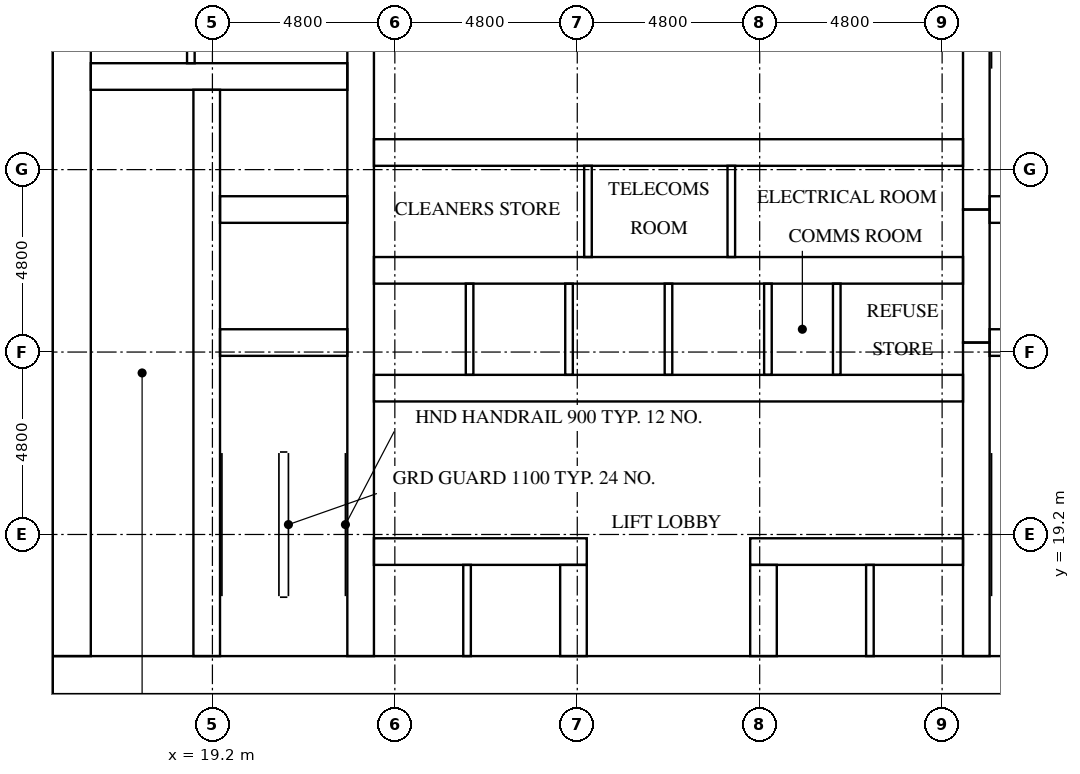
"""IFC4 building model, lengths in metres.
Left out: names, types, materials, properties, quantities, classifications, styles, units other than length and angle.
Written with IfcOpenShell. Run it as: python <this file> out.ifc"""

import sys

from ifc_helpers import new_model, si_unit, direction, frame, frame_2d, origin, place, context, subcontext, project, spatial, rectangle, extrude, element, fill, save


model = new_model("IFC4")
c1 = context("Model", 3, precision=1e-05, world=origin(), true_north=direction((0.0, 1.0)))
c2 = subcontext(c1, "Body", "Model", "MODEL_VIEW")
j1 = project(units=[si_unit("LENGTHUNIT", "METRE"), si_unit("PLANEANGLEUNIT", "RADIAN")], contexts=[c1])
p1 = place(None, origin())
s1 = spatial("IfcSite", under=j1, at=p1, CompositionType="ELEMENT")
p2 = place(p1, origin())
s2 = spatial("IfcBuilding", under=s1, at=p2, CompositionType="ELEMENT")
p3 = place(p2, frame((0.0, 0.0, 6.0)))
s3 = spatial("IfcBuildingStorey", under=s2, at=p3, CompositionType="ELEMENT", Elevation=6.0)
p4 = place(p3, frame((15.0, 15.5, 0.0), z_axis=(0.0, 0.0, 1.0), x_axis=(1.0, 0.0, 0.0)))
e1 = element("IfcWall", 1, at=p4, inside=s3, PredefinedType="SHEAR", context=c2, shape_type="SweptSolid", body=[
    extrude(rectangle(XDim=32.4, YDim=1.0, at=frame_2d((16.2, 0.0))), origin(), (0.0, 0.0, 1.0), 4.2),
])
p5 = place(p4, frame((15.3, 0.0, 0.0)))
e2 = element("IfcOpeningElement", 2, at=p5, cuts=e1, PredefinedType="OPENING", context=c2, shape_type="SweptSolid", body=[
    extrude(rectangle(XDim=1.8, YDim=2.1, at=frame_2d((0.9, 1.05))), frame((0.0, 0.51, 0.0), z_axis=(0.0, -1.0, 0.0), x_axis=(1.0, 0.0, 0.0)), (0.0, 0.0, 1.0), 1.02),
])
p6 = place(p3, frame((15.5, 16.0, 0.0), z_axis=(0.0, 0.0, 1.0), x_axis=(0.0, 1.0, 0.0)))
e3 = element("IfcWall", 3, at=p6, inside=s3, PredefinedType="SHEAR", context=c2, shape_type="SweptSolid", body=[
    extrude(rectangle(XDim=20.8, YDim=1.0, at=frame_2d((10.4, 0.0))), origin(), (0.0, 0.0, 1.0), 4.2),
])
p7 = place(p6, frame((4.76, 0.0, 0.0)))
e4 = element("IfcOpeningElement", 4, at=p7, cuts=e3, PredefinedType="OPENING", context=c2, shape_type="SweptSolid", body=[
    extrude(rectangle(XDim=1.2, YDim=2.1, at=frame_2d((0.6, 1.05))), frame((0.0, 0.51, 0.0), z_axis=(0.0, -1.0, 0.0), x_axis=(1.0, 0.0, 0.0)), (0.0, 0.0, 1.0), 1.02),
])
p8 = place(p3, frame((19.05, 16.0, 0.0), z_axis=(0.0, 0.0, 1.0), x_axis=(0.0, 1.0, 0.0)))
e5 = element("IfcWall", 5, at=p8, inside=s3, PredefinedType="SHEAR", context=c2, shape_type="SweptSolid", body=[
    extrude(rectangle(XDim=14.9, YDim=0.7, at=frame_2d((7.45, 0.0))), origin(), (0.0, 0.0, 1.0), 4.2),
])
p9 = place(p8, frame((9.45, 0.0, 0.0)))
e6 = element("IfcOpeningElement", 6, at=p9, cuts=e5, PredefinedType="OPENING", context=c2, shape_type="SweptSolid", body=[
    extrude(rectangle(XDim=1.1, YDim=2.1, at=frame_2d((0.55, 1.05))), frame((0.0, 0.36, 0.0), z_axis=(0.0, -1.0, 0.0), x_axis=(1.0, 0.0, 0.0)), (0.0, 0.0, 1.0), 0.72),
])
p10 = place(p8, frame((12.95, 0.0, 0.0)))
e7 = element("IfcOpeningElement", 7, at=p10, cuts=e5, PredefinedType="OPENING", context=c2, shape_type="SweptSolid", body=[
    extrude(rectangle(XDim=1.1, YDim=2.1, at=frame_2d((0.55, 1.05))), frame((0.0, 0.36, 0.0), z_axis=(0.0, -1.0, 0.0), x_axis=(1.0, 0.0, 0.0)), (0.0, 0.0, 1.0), 0.72),
])
p11 = place(p8, frame((0.2, 0.0, 0.0)))
e8 = element("IfcOpeningElement", 8, at=p11, cuts=e5, PredefinedType="OPENING", context=c2, shape_type="SweptSolid", body=[
    extrude(rectangle(XDim=1.2, YDim=2.1, at=frame_2d((0.6, 1.05))), frame((0.0, 0.36, 0.0), z_axis=(0.0, -1.0, 0.0), x_axis=(1.0, 0.0, 0.0)), (0.0, 0.0, 1.0), 0.72),
])
p12 = place(p3, frame((23.1, 16.0, 0.0), z_axis=(0.0, 0.0, 1.0), x_axis=(0.0, 1.0, 0.0)))
e9 = element("IfcWall", 9, at=p12, inside=s3, PredefinedType="SHEAR", context=c2, shape_type="SweptSolid", body=[
    extrude(rectangle(XDim=20.8, YDim=0.7, at=frame_2d((10.4, 0.0))), origin(), (0.0, 0.0, 1.0), 4.2),
])
p13 = place(p3, frame((39.3, 16.0, 0.0), z_axis=(0.0, 0.0, 1.0), x_axis=(0.0, 1.0, 0.0)))
e10 = element("IfcWall", 10, at=p13, inside=s3, PredefinedType="SHEAR", context=c2, shape_type="SweptSolid", body=[
    extrude(rectangle(XDim=8.25, YDim=0.7, at=frame_2d((4.125, 0.0))), origin(), (0.0, 0.0, 1.0), 4.2),
])
p14 = place(p3, frame((39.3, 24.25, 0.0), z_axis=(0.0, 0.0, 1.0), x_axis=(0.0, 1.0, 0.0)))
e11 = element("IfcWall", 11, at=p14, inside=s3, PredefinedType="SHEAR", context=c2, shape_type="SweptSolid", body=[
    extrude(rectangle(XDim=3.5, YDim=0.7, at=frame_2d((1.75, 0.0))), origin(), (0.0, 0.0, 1.0), 4.2),
])
p15 = place(p3, frame((39.3, 27.75, 0.0), z_axis=(0.0, 0.0, 1.0), x_axis=(0.0, 1.0, 0.0)))
e12 = element("IfcWall", 12, at=p15, inside=s3, PredefinedType="SHEAR", context=c2, shape_type="SweptSolid", body=[
    extrude(rectangle(XDim=9.05, YDim=0.7, at=frame_2d((4.525, 0.0))), origin(), (0.0, 0.0, 1.0), 4.2),
])
for number, where, z_axis, x_axis in (
    (13, (19.4, 24.25, 0.0), (0.0, 0.0, 1.0), (1.0, 0.0, 0.0)),
    (14, (19.4, 27.75, 0.0), (0.0, 0.0, 1.0), (1.0, 0.0, 0.0)),
):
    element("IfcWall", number, at=place(p3, frame(where, z_axis=z_axis, x_axis=x_axis)), inside=s3, PredefinedType="SHEAR", context=c2, shape_type="SweptSolid", body=[
        extrude(rectangle(XDim=3.35, YDim=0.7, at=frame_2d((1.675, 0.0))), origin(), (0.0, 0.0, 1.0), 4.2),
    ])
p16 = place(p3, frame((16.0, 31.25, 0.0), z_axis=(0.0, 0.0, 1.0), x_axis=(1.0, 0.0, 0.0)))
e15 = element("IfcWall", 15, at=p16, inside=s3, PredefinedType="SHEAR", context=c2, shape_type="SweptSolid", body=[
    extrude(rectangle(XDim=6.75, YDim=0.7, at=frame_2d((3.375, 0.0))), origin(), (0.0, 0.0, 1.0), 4.2),
])
for number, where, z_axis, x_axis in (
    (16, (39.65, 24.25, 0.0), (0.0, 0.0, 1.0), (1.0, 0.0, 0.0)),
    (17, (39.65, 27.75, 0.0), (0.0, 0.0, 1.0), (1.0, 0.0, 0.0)),
):
    element("IfcWall", number, at=place(p3, frame(where, z_axis=z_axis, x_axis=x_axis)), inside=s3, PredefinedType="SHEAR", context=c2, shape_type="SweptSolid", body=[
        extrude(rectangle(XDim=3.35, YDim=0.7, at=frame_2d((1.675, 0.0))), origin(), (0.0, 0.0, 1.0), 4.2),
    ])
p17 = place(p3, frame((23.45, 18.75, 0.0), z_axis=(0.0, 0.0, 1.0), x_axis=(1.0, 0.0, 0.0)))
e18 = element("IfcWall", 18, at=p17, inside=s3, PredefinedType="SHEAR", context=c2, shape_type="SweptSolid", body=[
    extrude(rectangle(XDim=5.6, YDim=0.7, at=frame_2d((2.8, 0.0))), origin(), (0.0, 0.0, 1.0), 4.2),
])
p18 = place(p17, frame((0.625, 0.0, 0.0)))
e19 = element("IfcOpeningElement", 19, at=p18, cuts=e18, PredefinedType="OPENING", context=c2, shape_type="SweptSolid", body=[
    extrude(rectangle(XDim=1.1, YDim=2.1, at=frame_2d((0.55, 1.05))), frame((0.0, 0.36, 0.0), z_axis=(0.0, -1.0, 0.0), x_axis=(1.0, 0.0, 0.0)), (0.0, 0.0, 1.0), 0.72),
])
p19 = place(p17, frame((3.175, 0.0, 0.0)))
e20 = element("IfcOpeningElement", 20, at=p19, cuts=e18, PredefinedType="OPENING", context=c2, shape_type="SweptSolid", body=[
    extrude(rectangle(XDim=1.1, YDim=2.1, at=frame_2d((0.55, 1.05))), frame((0.0, 0.36, 0.0), z_axis=(0.0, -1.0, 0.0), x_axis=(1.0, 0.0, 0.0)), (0.0, 0.0, 1.0), 0.72),
])
p20 = place(p3, frame((33.35, 18.75, 0.0), z_axis=(0.0, 0.0, 1.0), x_axis=(1.0, 0.0, 0.0)))
e21 = element("IfcWall", 21, at=p20, inside=s3, PredefinedType="SHEAR", context=c2, shape_type="SweptSolid", body=[
    extrude(rectangle(XDim=5.6, YDim=0.7, at=frame_2d((2.8, 0.0))), origin(), (0.0, 0.0, 1.0), 4.2),
])
p21 = place(p20, frame((1.325, 0.0, 0.0)))
e22 = element("IfcOpeningElement", 22, at=p21, cuts=e21, PredefinedType="OPENING", context=c2, shape_type="SweptSolid", body=[
    extrude(rectangle(XDim=1.1, YDim=2.1, at=frame_2d((0.55, 1.05))), frame((0.0, 0.36, 0.0), z_axis=(0.0, -1.0, 0.0), x_axis=(1.0, 0.0, 0.0)), (0.0, 0.0, 1.0), 0.72),
])
p22 = place(p20, frame((3.875, 0.0, 0.0)))
e23 = element("IfcOpeningElement", 23, at=p22, cuts=e21, PredefinedType="OPENING", context=c2, shape_type="SweptSolid", body=[
    extrude(rectangle(XDim=1.1, YDim=2.1, at=frame_2d((0.55, 1.05))), frame((0.0, 0.36, 0.0), z_axis=(0.0, -1.0, 0.0), x_axis=(1.0, 0.0, 0.0)), (0.0, 0.0, 1.0), 0.72),
])
p23 = place(p3, frame((23.45, 23.05, 0.0), z_axis=(0.0, 0.0, 1.0), x_axis=(1.0, 0.0, 0.0)))
e24 = element("IfcWall", 24, at=p23, inside=s3, PredefinedType="SHEAR", context=c2, shape_type="SweptSolid", body=[
    extrude(rectangle(XDim=15.5, YDim=0.7, at=frame_2d((7.75, 0.0))), origin(), (0.0, 0.0, 1.0), 4.2),
])
p24 = place(p23, frame((0.658, 0.0, 0.0)))
e25 = element("IfcOpeningElement", 25, at=p24, cuts=e24, PredefinedType="OPENING", context=c2, shape_type="SweptSolid", body=[
    extrude(rectangle(XDim=1.1, YDim=2.1, at=frame_2d((0.55, 1.05))), frame((0.0, 0.36, 0.0), z_axis=(0.0, -1.0, 0.0), x_axis=(1.0, 0.0, 0.0)), (0.0, 0.0, 1.0), 0.72),
])
p25 = place(p23, frame((3.275, 0.0, 0.0)))
e26 = element("IfcOpeningElement", 26, at=p25, cuts=e24, PredefinedType="OPENING", context=c2, shape_type="SweptSolid", body=[
    extrude(rectangle(XDim=1.1, YDim=2.1, at=frame_2d((0.55, 1.05))), frame((0.0, 0.36, 0.0), z_axis=(0.0, -1.0, 0.0), x_axis=(1.0, 0.0, 0.0)), (0.0, 0.0, 1.0), 0.72),
])
p26 = place(p23, frame((10.772, 0.0, 0.0)))
e27 = element("IfcOpeningElement", 27, at=p26, cuts=e24, PredefinedType="OPENING", context=c2, shape_type="SweptSolid", body=[
    extrude(rectangle(XDim=1.0, YDim=2.1, at=frame_2d((0.5, 1.05))), frame((0.0, 0.36, 0.0), z_axis=(0.0, -1.0, 0.0), x_axis=(1.0, 0.0, 0.0)), (0.0, 0.0, 1.0), 0.72),
])
p27 = place(p23, frame((13.389, 0.0, 0.0)))
e28 = element("IfcOpeningElement", 28, at=p27, cuts=e24, PredefinedType="OPENING", context=c2, shape_type="SweptSolid", body=[
    extrude(rectangle(XDim=1.0, YDim=2.1, at=frame_2d((0.5, 1.05))), frame((0.0, 0.36, 0.0), z_axis=(0.0, -1.0, 0.0), x_axis=(1.0, 0.0, 0.0)), (0.0, 0.0, 1.0), 0.72),
])
p28 = place(p3, frame((23.45, 26.15, 0.0), z_axis=(0.0, 0.0, 1.0), x_axis=(1.0, 0.0, 0.0)))
e29 = element("IfcWall", 29, at=p28, inside=s3, PredefinedType="SHEAR", context=c2, shape_type="SweptSolid", body=[
    extrude(rectangle(XDim=15.5, YDim=0.7, at=frame_2d((7.75, 0.0))), origin(), (0.0, 0.0, 1.0), 4.2),
])
p29 = place(p3, frame((23.45, 29.25, 0.0), z_axis=(0.0, 0.0, 1.0), x_axis=(1.0, 0.0, 0.0)))
e30 = element("IfcWall", 30, at=p29, inside=s3, PredefinedType="SHEAR", context=c2, shape_type="SweptSolid", body=[
    extrude(rectangle(XDim=15.5, YDim=0.7, at=frame_2d((7.75, 0.0))), origin(), (0.0, 0.0, 1.0), 4.2),
])
p30 = place(p29, frame((2.266, 0.0, 0.0)))
e31 = element("IfcOpeningElement", 31, at=p30, cuts=e30, PredefinedType="OPENING", context=c2, shape_type="SweptSolid", body=[
    extrude(rectangle(XDim=1.0, YDim=2.1, at=frame_2d((0.5, 1.05))), frame((0.0, 0.36, 0.0), z_axis=(0.0, -1.0, 0.0), x_axis=(1.0, 0.0, 0.0)), (0.0, 0.0, 1.0), 0.72),
])
p31 = place(p29, frame((7.018, 0.0, 0.0)))
e32 = element("IfcOpeningElement", 32, at=p31, cuts=e30, PredefinedType="OPENING", context=c2, shape_type="SweptSolid", body=[
    extrude(rectangle(XDim=1.0, YDim=2.1, at=frame_2d((0.5, 1.05))), frame((0.0, 0.36, 0.0), z_axis=(0.0, -1.0, 0.0), x_axis=(1.0, 0.0, 0.0)), (0.0, 0.0, 1.0), 0.72),
])
p32 = place(p29, frame((12.002, 0.0, 0.0)))
e33 = element("IfcOpeningElement", 33, at=p32, cuts=e30, PredefinedType="OPENING", context=c2, shape_type="SweptSolid", body=[
    extrude(rectangle(XDim=1.0, YDim=2.1, at=frame_2d((0.5, 1.05))), frame((0.0, 0.36, 0.0), z_axis=(0.0, -1.0, 0.0), x_axis=(1.0, 0.0, 0.0)), (0.0, 0.0, 1.0), 0.72),
])
for number, where, z_axis, x_axis in (
    (34, (28.7, 16.0, 0.0), (0.0, 0.0, 1.0), (0.0, 1.0, 0.0)),
    (35, (33.7, 16.0, 0.0), (0.0, 0.0, 1.0), (0.0, 1.0, 0.0)),
):
    element("IfcWall", number, at=place(p3, frame(where, z_axis=z_axis, x_axis=x_axis)), inside=s3, PredefinedType="SHEAR", context=c2, shape_type="SweptSolid", body=[
        extrude(rectangle(XDim=2.4, YDim=0.7, at=frame_2d((1.2, 0.0))), origin(), (0.0, 0.0, 1.0), 4.2),
    ])
for number, where, z_axis, x_axis in (
    (36, (25.967, 23.4, 0.0), (0.0, 0.0, 1.0), (0.0, 1.0, 0.0)),
    (37, (28.583, 23.4, 0.0), (0.0, 0.0, 1.0), (0.0, 1.0, 0.0)),
    (38, (31.2, 23.4, 0.0), (0.0, 0.0, 1.0), (0.0, 1.0, 0.0)),
    (39, (33.817, 23.4, 0.0), (0.0, 0.0, 1.0), (0.0, 1.0, 0.0)),
):
    element("IfcWall", number, at=place(p3, frame(where, z_axis=z_axis, x_axis=x_axis)), inside=s3, PredefinedType="SOLIDWALL", context=c2, shape_type="SweptSolid", body=[
        extrude(rectangle(XDim=2.4, YDim=0.2, at=frame_2d((1.2, 0.0))), origin(), (0.0, 0.0, 1.0), 4.2),
    ])
for number, where, z_axis, x_axis in (
    (40, (25.9, 16.0, 0.0), (0.0, 0.0, 1.0), (0.0, 1.0, 0.0)),
    (41, (36.5, 16.0, 0.0), (0.0, 0.0, 1.0), (0.0, 1.0, 0.0)),
):
    element("IfcWall", number, at=place(p3, frame(where, z_axis=z_axis, x_axis=x_axis)), inside=s3, PredefinedType="SOLIDWALL", context=c2, shape_type="SweptSolid", body=[
        extrude(rectangle(XDim=2.4, YDim=0.2, at=frame_2d((1.2, 0.0))), origin(), (0.0, 0.0, 1.0), 4.2),
    ])
p33 = place(p3, frame((18.633, 31.6, 0.0), z_axis=(0.0, 0.0, 1.0), x_axis=(0.0, 1.0, 0.0)))
e42 = element("IfcWall", 42, at=p33, inside=s3, PredefinedType="PARTITIONING", context=c2, shape_type="SweptSolid", body=[
    extrude(rectangle(XDim=5.2, YDim=0.2, at=frame_2d((2.6, 0.0))), origin(), (0.0, 0.0, 1.0), 4.2),
])
p34 = place(p3, frame((35.628, 23.4, 0.0), z_axis=(0.0, 0.0, 1.0), x_axis=(0.0, 1.0, 0.0)))
e43 = element("IfcWall", 43, at=p34, inside=s3, PredefinedType="PARTITIONING", context=c2, shape_type="SweptSolid", body=[
    extrude(rectangle(XDim=2.4, YDim=0.2, at=frame_2d((1.2, 0.0))), origin(), (0.0, 0.0, 1.0), 4.2),
])
for number, where, z_axis, x_axis in (
    (44, (29.082, 26.5, 0.0), (0.0, 0.0, 1.0), (0.0, 1.0, 0.0)),
    (45, (32.853, 26.5, 0.0), (0.0, 0.0, 1.0), (0.0, 1.0, 0.0)),
):
    element("IfcWall", number, at=place(p3, frame(where, z_axis=z_axis, x_axis=x_axis)), inside=s3, PredefinedType="PARTITIONING", context=c2, shape_type="SweptSolid", body=[
        extrude(rectangle(XDim=2.4, YDim=0.2, at=frame_2d((1.2, 0.0))), origin(), (0.0, 0.0, 1.0), 4.2),
    ])
p35 = place(p18, origin())
e46 = element("IfcDoor", 46, at=p35, inside=s3, OperationType="DOUBLE_DOOR_SLIDING", PredefinedType="DOOR", context=c2, shape_type="SweptSolid", body=[
    extrude(rectangle(XDim=1.1, YDim=2.1, at=frame_2d((0.55, 1.05))), frame((0.0, 0.025, 0.0), z_axis=(0.0, -1.0, 0.0), x_axis=(1.0, 0.0, 0.0)), (0.0, 0.0, 1.0), 0.05),
])
fill(e19, e46)
p36 = place(p19, origin())
e47 = element("IfcDoor", 47, at=p36, inside=s3, OperationType="DOUBLE_DOOR_SLIDING", PredefinedType="DOOR", context=c2, shape_type="SweptSolid", body=[
    extrude(rectangle(XDim=1.1, YDim=2.1, at=frame_2d((0.55, 1.05))), frame((0.0, 0.025, 0.0), z_axis=(0.0, -1.0, 0.0), x_axis=(1.0, 0.0, 0.0)), (0.0, 0.0, 1.0), 0.05),
])
fill(e20, e47)
p37 = place(p21, origin())
e48 = element("IfcDoor", 48, at=p37, inside=s3, OperationType="DOUBLE_DOOR_SLIDING", PredefinedType="DOOR", context=c2, shape_type="SweptSolid", body=[
    extrude(rectangle(XDim=1.1, YDim=2.1, at=frame_2d((0.55, 1.05))), frame((0.0, 0.025, 0.0), z_axis=(0.0, -1.0, 0.0), x_axis=(1.0, 0.0, 0.0)), (0.0, 0.0, 1.0), 0.05),
])
fill(e22, e48)
p38 = place(p22, origin())
e49 = element("IfcDoor", 49, at=p38, inside=s3, OperationType="DOUBLE_DOOR_SLIDING", PredefinedType="DOOR", context=c2, shape_type="SweptSolid", body=[
    extrude(rectangle(XDim=1.1, YDim=2.1, at=frame_2d((0.55, 1.05))), frame((0.0, 0.025, 0.0), z_axis=(0.0, -1.0, 0.0), x_axis=(1.0, 0.0, 0.0)), (0.0, 0.0, 1.0), 0.05),
])
fill(e23, e49)
p39 = place(p24, origin())
e50 = element("IfcDoor", 50, at=p39, inside=s3, OperationType="DOUBLE_DOOR_SLIDING", PredefinedType="DOOR", context=c2, shape_type="SweptSolid", body=[
    extrude(rectangle(XDim=1.1, YDim=2.1, at=frame_2d((0.55, 1.05))), frame((0.0, 0.025, 0.0), z_axis=(0.0, -1.0, 0.0), x_axis=(1.0, 0.0, 0.0)), (0.0, 0.0, 1.0), 0.05),
])
fill(e25, e50)
p40 = place(p25, origin())
e51 = element("IfcDoor", 51, at=p40, inside=s3, OperationType="DOUBLE_DOOR_SLIDING", PredefinedType="DOOR", context=c2, shape_type="SweptSolid", body=[
    extrude(rectangle(XDim=1.1, YDim=2.1, at=frame_2d((0.55, 1.05))), frame((0.0, 0.025, 0.0), z_axis=(0.0, -1.0, 0.0), x_axis=(1.0, 0.0, 0.0)), (0.0, 0.0, 1.0), 0.05),
])
fill(e26, e51)
p41 = place(p9, origin())
e52 = element("IfcDoor", 52, at=p41, inside=s3, OperationType="DOUBLE_DOOR_SLIDING", PredefinedType="DOOR", context=c2, shape_type="SweptSolid", body=[
    extrude(rectangle(XDim=1.1, YDim=2.1, at=frame_2d((0.55, 1.05))), frame((0.0, 0.025, 0.0), z_axis=(0.0, -1.0, 0.0), x_axis=(1.0, 0.0, 0.0)), (0.0, 0.0, 1.0), 0.05),
])
fill(e6, e52)
p42 = place(p10, origin())
e53 = element("IfcDoor", 53, at=p42, inside=s3, OperationType="DOUBLE_DOOR_SLIDING", PredefinedType="DOOR", context=c2, shape_type="SweptSolid", body=[
    extrude(rectangle(XDim=1.1, YDim=2.1, at=frame_2d((0.55, 1.05))), frame((0.0, 0.025, 0.0), z_axis=(0.0, -1.0, 0.0), x_axis=(1.0, 0.0, 0.0)), (0.0, 0.0, 1.0), 0.05),
])
fill(e7, e53)
p43 = place(p11, frame((1.2, 0.0, 0.0), z_axis=(0.0, 0.0, 1.0), x_axis=(-1.0, 0.0, 0.0)))
e54 = element("IfcDoor", 54, at=p43, inside=s3, OperationType="SINGLE_SWING_LEFT", PredefinedType="DOOR", context=c2, shape_type="SweptSolid", body=[
    extrude(rectangle(XDim=1.2, YDim=2.1, at=frame_2d((0.6, 1.05))), frame((0.0, 0.025, 0.0), z_axis=(0.0, -1.0, 0.0), x_axis=(1.0, 0.0, 0.0)), (0.0, 0.0, 1.0), 0.05),
])
fill(e8, e54)
p44 = place(p5, frame((1.8, 0.0, 0.0), z_axis=(0.0, 0.0, 1.0), x_axis=(-1.0, 0.0, 0.0)))
e55 = element("IfcDoor", 55, at=p44, inside=s3, OperationType="DOUBLE_DOOR_SINGLE_SWING", PredefinedType="DOOR", context=c2, shape_type="SweptSolid", body=[
    extrude(rectangle(XDim=1.8, YDim=2.1, at=frame_2d((0.9, 1.05))), frame((0.0, 0.025, 0.0), z_axis=(0.0, -1.0, 0.0), x_axis=(1.0, 0.0, 0.0)), (0.0, 0.0, 1.0), 0.05),
])
fill(e2, e55)
p45 = place(p7, frame((1.2, 0.0, 0.0), z_axis=(0.0, 0.0, 1.0), x_axis=(-1.0, 0.0, 0.0)))
e56 = element("IfcDoor", 56, at=p45, inside=s3, OperationType="SINGLE_SWING_RIGHT", PredefinedType="DOOR", context=c2, shape_type="SweptSolid", body=[
    extrude(rectangle(XDim=1.2, YDim=2.1, at=frame_2d((0.6, 1.05))), frame((0.0, 0.025, 0.0), z_axis=(0.0, -1.0, 0.0), x_axis=(1.0, 0.0, 0.0)), (0.0, 0.0, 1.0), 0.05),
])
fill(e4, e56)
p46 = place(p26, frame((1.0, 0.0, 0.0), z_axis=(0.0, 0.0, 1.0), x_axis=(-1.0, 0.0, 0.0)))
e57 = element("IfcDoor", 57, at=p46, inside=s3, OperationType="SINGLE_SWING_RIGHT", PredefinedType="DOOR", context=c2, shape_type="SweptSolid", body=[
    extrude(rectangle(XDim=1.0, YDim=2.1, at=frame_2d((0.5, 1.05))), frame((0.0, 0.025, 0.0), z_axis=(0.0, -1.0, 0.0), x_axis=(1.0, 0.0, 0.0)), (0.0, 0.0, 1.0), 0.05),
])
fill(e27, e57)
p47 = place(p27, frame((1.0, 0.0, 0.0), z_axis=(0.0, 0.0, 1.0), x_axis=(-1.0, 0.0, 0.0)))
e58 = element("IfcDoor", 58, at=p47, inside=s3, OperationType="SINGLE_SWING_LEFT", PredefinedType="DOOR", context=c2, shape_type="SweptSolid", body=[
    extrude(rectangle(XDim=1.0, YDim=2.1, at=frame_2d((0.5, 1.05))), frame((0.0, 0.025, 0.0), z_axis=(0.0, -1.0, 0.0), x_axis=(1.0, 0.0, 0.0)), (0.0, 0.0, 1.0), 0.05),
])
fill(e28, e58)
p48 = place(p30, origin())
e59 = element("IfcDoor", 59, at=p48, inside=s3, OperationType="SINGLE_SWING_RIGHT", PredefinedType="DOOR", context=c2, shape_type="SweptSolid", body=[
    extrude(rectangle(XDim=1.0, YDim=2.1, at=frame_2d((0.5, 1.05))), frame((0.0, 0.025, 0.0), z_axis=(0.0, -1.0, 0.0), x_axis=(1.0, 0.0, 0.0)), (0.0, 0.0, 1.0), 0.05),
])
fill(e31, e59)
p49 = place(p31, origin())
e60 = element("IfcDoor", 60, at=p49, inside=s3, OperationType="SINGLE_SWING_LEFT", PredefinedType="DOOR", context=c2, shape_type="SweptSolid", body=[
    extrude(rectangle(XDim=1.0, YDim=2.1, at=frame_2d((0.5, 1.05))), frame((0.0, 0.025, 0.0), z_axis=(0.0, -1.0, 0.0), x_axis=(1.0, 0.0, 0.0)), (0.0, 0.0, 1.0), 0.05),
])
fill(e32, e60)
p50 = place(p32, origin())
e61 = element("IfcDoor", 61, at=p50, inside=s3, OperationType="SINGLE_SWING_RIGHT", PredefinedType="DOOR", context=c2, shape_type="SweptSolid", body=[
    extrude(rectangle(XDim=1.0, YDim=2.1, at=frame_2d((0.5, 1.05))), frame((0.0, 0.025, 0.0), z_axis=(0.0, -1.0, 0.0), x_axis=(1.0, 0.0, 0.0)), (0.0, 0.0, 1.0), 0.05),
])
fill(e33, e61)
save(model, sys.argv[1])
